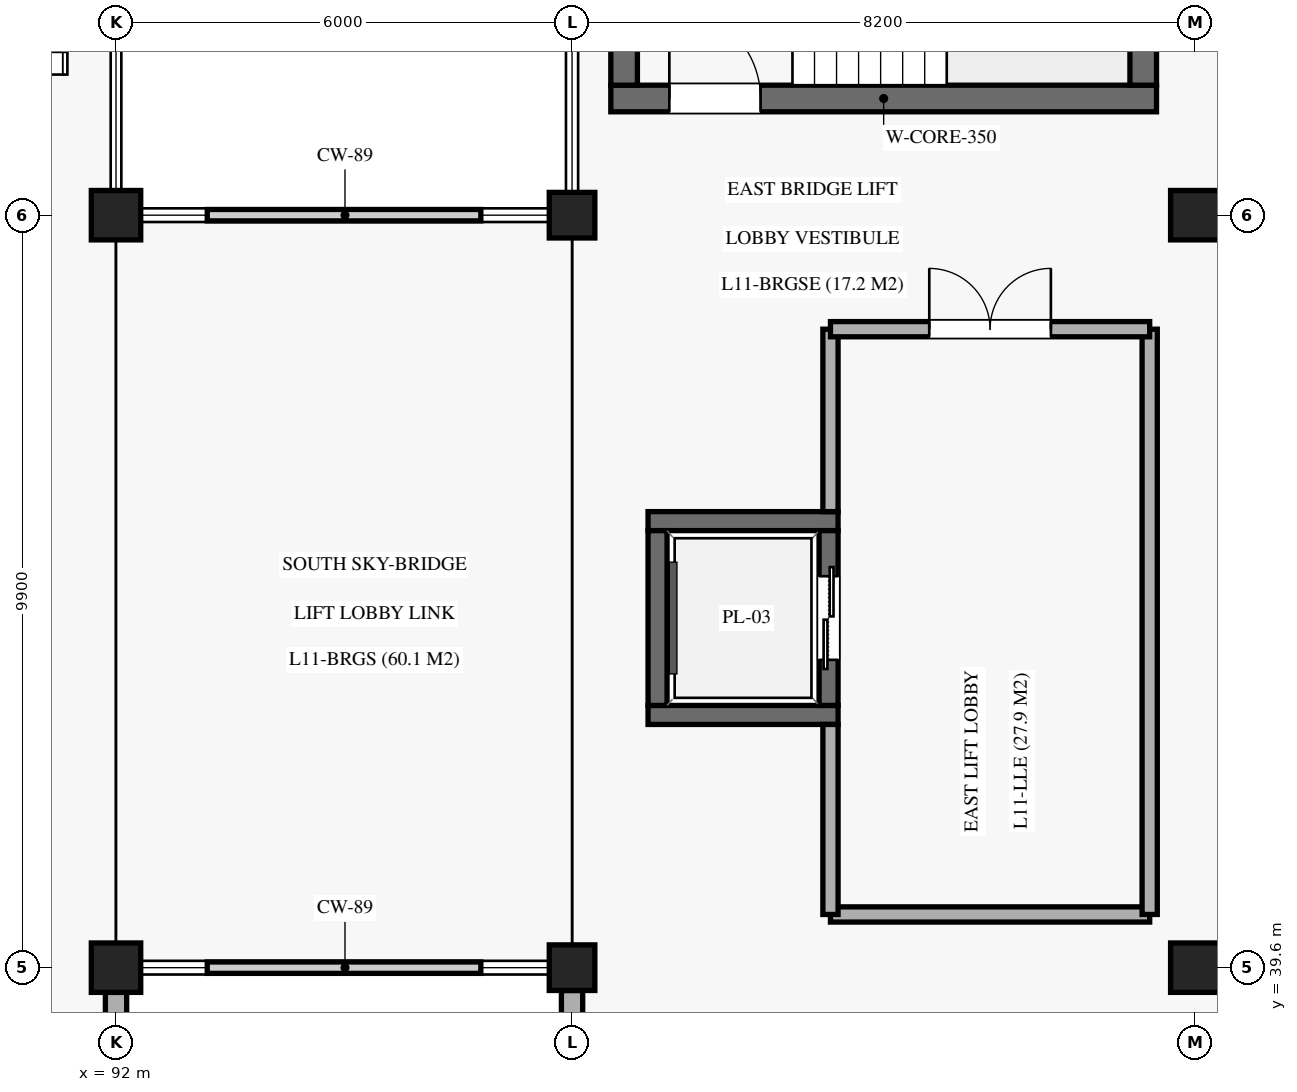
"""IFC4 building model, lengths in metres.
Left out: names, types, materials, properties, quantities, classifications, styles, units other than length and angle.
Written with IfcOpenShell. Run it as: python <this file> out.ifc"""

import sys

from ifc_helpers import new_model, si_unit, direction, frame, frame_2d, origin, origin_2d, place, context, subcontext, project, spatial, rectangle, extrude, element, fill, save


model = new_model("IFC4")
c1 = context("Model", 3, precision=1e-05, world=origin(), true_north=direction((0.0, 1.0)))
c2 = subcontext(c1, "Body", "Model", "MODEL_VIEW")
j1 = project(units=[si_unit("LENGTHUNIT", "METRE"), si_unit("PLANEANGLEUNIT", "RADIAN")], contexts=[c1])
p1 = place(None, origin())
s1 = spatial("IfcSite", under=j1, at=p1, CompositionType="ELEMENT")
p2 = place(p1, origin())
s2 = spatial("IfcBuilding", under=s1, at=p2, CompositionType="ELEMENT")
p3 = place(p2, frame((0.0, 0.0, 57.12)))
s3 = spatial("IfcBuildingStorey", under=s2, at=p3, CompositionType="ELEMENT", Elevation=57.12)
for number, where, z_axis, x_axis in (
    (1, (92.0, 39.6, 0.0), (0.0, 0.0, 1.0), (1.0, 0.0, 0.0)),
    (2, (92.0, 49.5, 0.0), (0.0, 0.0, 1.0), (1.0, 0.0, 0.0)),
):
    element("IfcColumn", number, at=place(p3, frame(where, z_axis=z_axis, x_axis=x_axis)), inside=s3, PredefinedType="COLUMN", context=c2, shape_type="SweptSolid", body=[
        extrude(rectangle(XDim=0.65, YDim=0.65, at=origin_2d()), origin(), (0.0, 0.0, 1.0), 5.1),
    ])
for number, where, z_axis, x_axis in (
    (3, (98.0, 39.6, 0.0), (0.0, 0.0, 1.0), (1.0, 0.0, 0.0)),
    (4, (98.0, 49.5, 0.0), (0.0, 0.0, 1.0), (1.0, 0.0, 0.0)),
):
    element("IfcColumn", number, at=place(p3, frame(where, z_axis=z_axis, x_axis=x_axis)), inside=s3, PredefinedType="COLUMN", context=c2, shape_type="SweptSolid", body=[
        extrude(rectangle(XDim=0.6, YDim=0.6, at=origin_2d()), origin(), (0.0, 0.0, 1.0), 5.1),
    ])
for number, where, z_axis, x_axis in (
    (5, (106.2, 39.6, 0.0), (0.0, 0.0, 1.0), (1.0, 0.0, 0.0)),
    (6, (106.2, 49.5, 0.0), (0.0, 0.0, 1.0), (1.0, 0.0, 0.0)),
):
    element("IfcColumn", number, at=place(p3, frame(where, z_axis=z_axis, x_axis=x_axis)), inside=s3, PredefinedType="COLUMN", context=c2, shape_type="SweptSolid", body=[
        extrude(rectangle(XDim=0.65, YDim=0.65, at=origin_2d()), origin(), (0.0, 0.0, 1.0), 5.1),
    ])
p4 = place(p3, frame((92.0, 30.025, 0.0), z_axis=(0.0, 0.0, 1.0), x_axis=(0.0, 1.0, 0.0)))
e7 = element("IfcWall", 7, at=p4, inside=s3, PredefinedType="SOLIDWALL", context=c2, shape_type="SweptSolid", body=[
    extrude(rectangle(XDim=9.25, YDim=0.28, at=frame_2d((4.625, 0.0))), origin(), (0.0, 0.0, 1.0), 4.12),
])
p5 = place(p4, frame((3.625, 0.0, 1.45)))
e8 = element("IfcOpeningElement", 8, at=p5, cuts=e7, PredefinedType="OPENING", context=c2, shape_type="SweptSolid", body=[
    extrude(rectangle(XDim=1.6, YDim=1.65, at=frame_2d((0.8, 0.825))), frame((0.0, 0.15, 0.0), z_axis=(0.0, -1.0, 0.0), x_axis=(1.0, 0.0, 0.0)), (0.0, 0.0, 1.0), 0.3),
])
p6 = place(p3, frame((98.0, 30.0, 0.0), z_axis=(0.0, 0.0, 1.0), x_axis=(0.0, 1.0, 0.0)))
e9 = element("IfcWall", 9, at=p6, inside=s3, PredefinedType="SOLIDWALL", context=c2, shape_type="SweptSolid", body=[
    extrude(rectangle(XDim=9.3, YDim=0.28, at=frame_2d((4.65, 0.0))), origin(), (0.0, 0.0, 1.0), 4.12),
])
p7 = place(p6, frame((3.65, 0.0, 1.45)))
e10 = element("IfcOpeningElement", 10, at=p7, cuts=e9, PredefinedType="OPENING", context=c2, shape_type="SweptSolid", body=[
    extrude(rectangle(XDim=2.3, YDim=1.55, at=frame_2d((1.15, 0.775))), frame((0.0, 0.15, 0.0), z_axis=(0.0, -1.0, 0.0), x_axis=(1.0, 0.0, 0.0)), (0.0, 0.0, 1.0), 0.3),
])
p8 = place(p3, frame((98.51, 51.035, 0.0), z_axis=(0.0, 0.0, 1.0), x_axis=(1.0, 0.0, 0.0)))
e11 = element("IfcWall", 11, at=p8, inside=s3, PredefinedType="SHEAR", context=c2, shape_type="SweptSolid", body=[
    extrude(rectangle(XDim=7.18, YDim=0.35, at=frame_2d((3.59, 0.0))), origin(), (0.0, 0.0, 1.0), 4.87),
])
p9 = place(p8, frame((0.77, 0.0, 0.0)))
e12 = element("IfcOpeningElement", 12, at=p9, cuts=e11, PredefinedType="OPENING", context=c2, shape_type="SweptSolid", body=[
    extrude(rectangle(XDim=1.2, YDim=2.2, at=frame_2d((0.6, 1.1))), frame((0.0, 0.185, 0.0), z_axis=(0.0, -1.0, 0.0), x_axis=(1.0, 0.0, 0.0)), (0.0, 0.0, 1.0), 0.37),
])
for number, where, z_axis, x_axis in (
    (13, (98.685, 51.21, 0.0), (0.0, 0.0, 1.0), (0.0, 1.0, 0.0)),
    (14, (105.515, 51.21, 0.0), (0.0, 0.0, 1.0), (0.0, 1.0, 0.0)),
):
    element("IfcWall", number, at=place(p3, frame(where, z_axis=z_axis, x_axis=x_axis)), inside=s3, PredefinedType="SHEAR", context=c2, shape_type="SweptSolid", body=[
        extrude(rectangle(XDim=6.48, YDim=0.35, at=frame_2d((3.24, 0.0))), origin(), (0.0, 0.0, 1.0), 4.87),
    ])
for number, where, z_axis, x_axis in (
    (15, (99.0, 42.925, 0.0), (0.0, 0.0, 1.0), (1.0, 0.0, 0.0)),
    (16, (99.0, 45.475, 0.0), (0.0, 0.0, 1.0), (1.0, 0.0, 0.0)),
):
    element("IfcWall", number, at=place(p3, frame(where, z_axis=z_axis, x_axis=x_axis)), inside=s3, PredefinedType="SOLIDWALL", context=c2, shape_type="SweptSolid", body=[
        extrude(rectangle(XDim=2.5, YDim=0.25, at=frame_2d((1.25, 0.0))), origin(), (0.0, 0.0, 1.0), 4.85),
    ])
p10 = place(p3, frame((99.125, 43.05, 0.0), z_axis=(0.0, 0.0, 1.0), x_axis=(0.0, 1.0, 0.0)))
e17 = element("IfcWall", 17, at=p10, inside=s3, PredefinedType="SOLIDWALL", context=c2, shape_type="SweptSolid", body=[
    extrude(rectangle(XDim=2.3, YDim=0.25, at=frame_2d((1.15, 0.0))), origin(), (0.0, 0.0, 1.0), 4.85),
])
p11 = place(p3, frame((101.375, 43.05, 0.0), z_axis=(0.0, 0.0, 1.0), x_axis=(0.0, 1.0, 0.0)))
e18 = element("IfcWall", 18, at=p11, inside=s3, PredefinedType="SOLIDWALL", context=c2, shape_type="SweptSolid", body=[
    extrude(rectangle(XDim=2.3, YDim=0.25, at=frame_2d((1.15, 0.0))), origin(), (0.0, 0.0, 1.0), 4.85),
])
p12 = place(p11, frame((0.6, 0.0, 0.0)))
e19 = element("IfcOpeningElement", 19, at=p12, cuts=e18, PredefinedType="OPENING", context=c2, shape_type="SweptSolid", body=[
    extrude(rectangle(XDim=1.1, YDim=2.2, at=frame_2d((0.55, 1.1))), frame((0.0, 0.135, 0.0), z_axis=(0.0, -1.0, 0.0), x_axis=(1.0, 0.0, 0.0)), (0.0, 0.0, 1.0), 0.27),
])
p13 = place(p3, frame((101.4, 40.3, 0.0), z_axis=(0.0, 0.0, 1.0), x_axis=(1.0, 0.0, 0.0)))
e20 = element("IfcWall", 20, at=p13, inside=s3, PredefinedType="SOLIDWALL", context=c2, shape_type="SweptSolid", body=[
    extrude(rectangle(XDim=4.2, YDim=0.2, at=frame_2d((2.1, 0.0))), origin(), (0.0, 0.0, 1.0), 3.99),
])
p14 = place(p3, frame((101.4, 40.3, 0.0), z_axis=(0.0, 0.0, 1.0), x_axis=(0.0, 1.0, 0.0)))
e21 = element("IfcWall", 21, at=p14, inside=s3, PredefinedType="SOLIDWALL", context=c2, shape_type="SweptSolid", body=[
    extrude(rectangle(XDim=2.5, YDim=0.2, at=frame_2d((1.25, 0.0))), origin(), (0.0, 0.0, 1.0), 3.99),
])
p15 = place(p3, frame((101.4, 45.6, 0.0), z_axis=(0.0, 0.0, 1.0), x_axis=(0.0, 1.0, 0.0)))
e22 = element("IfcWall", 22, at=p15, inside=s3, PredefinedType="SOLIDWALL", context=c2, shape_type="SweptSolid", body=[
    extrude(rectangle(XDim=2.4, YDim=0.2, at=frame_2d((1.2, 0.0))), origin(), (0.0, 0.0, 1.0), 3.99),
])
p16 = place(p3, frame((105.6, 40.3, 0.0), z_axis=(0.0, 0.0, 1.0), x_axis=(0.0, 1.0, 0.0)))
e23 = element("IfcWall", 23, at=p16, inside=s3, PredefinedType="SOLIDWALL", context=c2, shape_type="SweptSolid", body=[
    extrude(rectangle(XDim=7.7, YDim=0.2, at=frame_2d((3.85, 0.0))), origin(), (0.0, 0.0, 1.0), 3.99),
])
p17 = place(p3, frame((101.4, 48.0, 0.0), z_axis=(0.0, 0.0, 1.0), x_axis=(1.0, 0.0, 0.0)))
e24 = element("IfcWall", 24, at=p17, inside=s3, PredefinedType="SOLIDWALL", context=c2, shape_type="SweptSolid", body=[
    extrude(rectangle(XDim=4.2, YDim=0.2, at=frame_2d((2.1, 0.0))), origin(), (0.0, 0.0, 1.0), 3.99),
])
p18 = place(p17, frame((1.3, 0.0, 0.0)))
e25 = element("IfcOpeningElement", 25, at=p18, cuts=e24, PredefinedType="OPENING", context=c2, shape_type="SweptSolid", body=[
    extrude(rectangle(XDim=1.6, YDim=2.2, at=frame_2d((0.8, 1.1))), frame((0.0, 0.11, 0.0), z_axis=(0.0, -1.0, 0.0), x_axis=(1.0, 0.0, 0.0)), (0.0, 0.0, 1.0), 0.22),
])
p19 = place(p9, origin())
e26 = element("IfcDoor", 26, at=p19, inside=s3, OperationType="SINGLE_SWING_LEFT", PredefinedType="DOOR", context=c2, shape_type="SweptSolid", body=[
    extrude(rectangle(XDim=1.2, YDim=2.2, at=frame_2d((0.6, 1.1))), frame((0.0, 0.025, 0.0), z_axis=(0.0, -1.0, 0.0), x_axis=(1.0, 0.0, 0.0)), (0.0, 0.0, 1.0), 0.05),
])
fill(e12, e26)
p20 = place(p12, origin())
e27 = element("IfcDoor", 27, at=p20, inside=s3, OperationType="DOUBLE_DOOR_SLIDING", PredefinedType="DOOR", context=c2, shape_type="SweptSolid", body=[
    extrude(rectangle(XDim=1.1, YDim=2.2, at=frame_2d((0.55, 1.1))), frame((0.0, 0.025, 0.0), z_axis=(0.0, -1.0, 0.0), x_axis=(1.0, 0.0, 0.0)), (0.0, 0.0, 1.0), 0.05),
])
fill(e19, e27)
p21 = place(p18, origin())
e28 = element("IfcDoor", 28, at=p21, inside=s3, OperationType="DOUBLE_DOOR_SINGLE_SWING", PredefinedType="DOOR", context=c2, shape_type="SweptSolid", body=[
    extrude(rectangle(XDim=1.6, YDim=2.2, at=frame_2d((0.8, 1.1))), frame((0.0, 0.025, 0.0), z_axis=(0.0, -1.0, 0.0), x_axis=(1.0, 0.0, 0.0)), (0.0, 0.0, 1.0), 0.05),
])
fill(e25, e28)
save(model, sys.argv[1])
